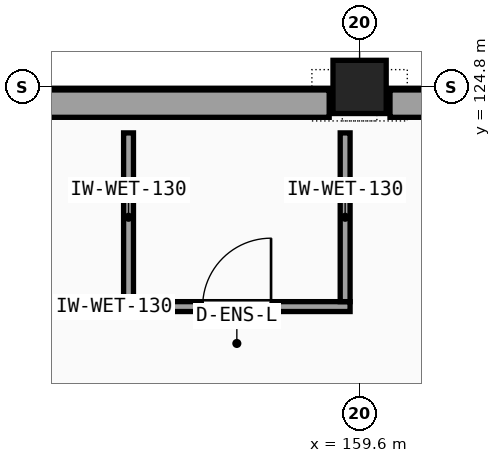
"""IFC4 building model, lengths in metres.
Left out: names, types, materials, properties, quantities, classifications, styles, units other than length and angle.
Written with IfcOpenShell. Run it as: python <this file> out.ifc"""

import sys

from ifc_helpers import new_model, si_unit, direction, frame, frame_2d, origin, origin_2d, place, context, subcontext, project, spatial, rectangle, extrude, element, fill, save


model = new_model("IFC4")
c1 = context("Model", 3, precision=1e-05, world=origin(), true_north=direction((0.0, 1.0)))
c2 = subcontext(c1, "Body", "Model", "MODEL_VIEW")
j1 = project(units=[si_unit("LENGTHUNIT", "METRE"), si_unit("PLANEANGLEUNIT", "RADIAN")], contexts=[c1])
p1 = place(None, origin())
s1 = spatial("IfcSite", under=j1, at=p1, CompositionType="ELEMENT")
p2 = place(p1, origin())
s2 = spatial("IfcBuilding", under=s1, at=p2, CompositionType="ELEMENT")
p3 = place(p2, frame((0.0, 0.0, 10.2)))
s3 = spatial("IfcBuildingStorey", under=s2, at=p3, CompositionType="ELEMENT", Elevation=10.2)
p4 = place(p3, frame((159.6, 124.8, 0.0), z_axis=(0.0, 0.0, 1.0), x_axis=(1.0, 0.0, 0.0)))
e1 = element("IfcColumn", 1, at=p4, inside=s3, PredefinedType="COLUMN", context=c2, shape_type="SweptSolid", body=[
    extrude(rectangle(XDim=0.7, YDim=0.7, at=origin_2d()), origin(), (0.0, 0.0, 1.0), 4.65),
])
p5 = place(p3, frame((151.6, 124.58, 0.0), z_axis=(0.0, 0.0, 1.0), x_axis=(1.0, 0.0, 0.0)))
e2 = element("IfcWall", 2, at=p5, inside=s3, PredefinedType="SOLIDWALL", context=c2, shape_type="SweptSolid", body=[
    extrude(rectangle(XDim=7.6, YDim=0.36, at=frame_2d((3.8, 0.0))), origin(), (0.0, 0.0, 1.0), 4.05),
])
p6 = place(p3, frame((160.0, 124.58, 0.0), z_axis=(0.0, 0.0, 1.0), x_axis=(1.0, 0.0, 0.0)))
e3 = element("IfcWall", 3, at=p6, inside=s3, PredefinedType="SOLIDWALL", context=c2, shape_type="SweptSolid", body=[
    extrude(rectangle(XDim=7.8, YDim=0.36, at=frame_2d((3.9, 0.0))), origin(), (0.0, 0.0, 1.0), 4.05),
])
p7 = place(p6, frame((3.225, 0.0, 1.0)))
e4 = element("IfcOpeningElement", 4, at=p7, cuts=e3, PredefinedType="OPENING", context=c2, shape_type="SweptSolid", body=[
    extrude(rectangle(XDim=1.35, YDim=1.45, at=frame_2d((0.675, 0.725))), frame((0.0, 0.19, 0.0), z_axis=(0.0, -1.0, 0.0), x_axis=(1.0, 0.0, 0.0)), (0.0, 0.0, 1.0), 0.38),
])
p8 = place(p3, frame((156.495, 121.91, 0.0), z_axis=(0.0, 0.0, 1.0), x_axis=(1.0, 0.0, 0.0)))
e5 = element("IfcWall", 5, at=p8, inside=s3, PredefinedType="PARTITIONING", context=c2, shape_type="SweptSolid", body=[
    extrude(rectangle(XDim=2.98, YDim=0.13, at=frame_2d((1.49, 0.0))), origin(), (0.0, 0.0, 1.0), 4.08),
])
p9 = place(p8, frame((1.04, 0.0, 0.0)))
e6 = element("IfcOpeningElement", 6, at=p9, cuts=e5, PredefinedType="OPENING", context=c2, shape_type="SweptSolid", body=[
    extrude(rectangle(XDim=0.9, YDim=2.1, at=frame_2d((0.45, 1.05))), frame((0.0, 0.075, 0.0), z_axis=(0.0, -1.0, 0.0), x_axis=(1.0, 0.0, 0.0)), (0.0, 0.0, 1.0), 0.15),
])
p10 = place(p3, frame((156.56, 121.975, 0.0), z_axis=(0.0, 0.0, 1.0), x_axis=(0.0, 1.0, 0.0)))
e7 = element("IfcWall", 7, at=p10, inside=s3, PredefinedType="PARTITIONING", context=c2, shape_type="SweptSolid", body=[
    extrude(rectangle(XDim=2.22, YDim=0.13, at=frame_2d((1.11, 0.0))), origin(), (0.0, 0.0, 1.0), 4.37),
])
p11 = place(p3, frame((159.41, 121.975, 0.0), z_axis=(0.0, 0.0, 1.0), x_axis=(0.0, 1.0, 0.0)))
e8 = element("IfcWall", 8, at=p11, inside=s3, PredefinedType="PARTITIONING", context=c2, shape_type="SweptSolid", body=[
    extrude(rectangle(XDim=2.22, YDim=0.13, at=frame_2d((1.11, 0.0))), origin(), (0.0, 0.0, 1.0), 4.08),
])
p12 = place(p9, origin())
e9 = element("IfcDoor", 9, at=p12, inside=s3, OperationType="SINGLE_SWING_RIGHT", PredefinedType="DOOR", context=c2, shape_type="SweptSolid", body=[
    extrude(rectangle(XDim=0.9, YDim=2.1, at=frame_2d((0.45, 1.05))), frame((0.0, 0.025, 0.0), z_axis=(0.0, -1.0, 0.0), x_axis=(1.0, 0.0, 0.0)), (0.0, 0.0, 1.0), 0.05),
])
fill(e6, e9)
save(model, sys.argv[1])
